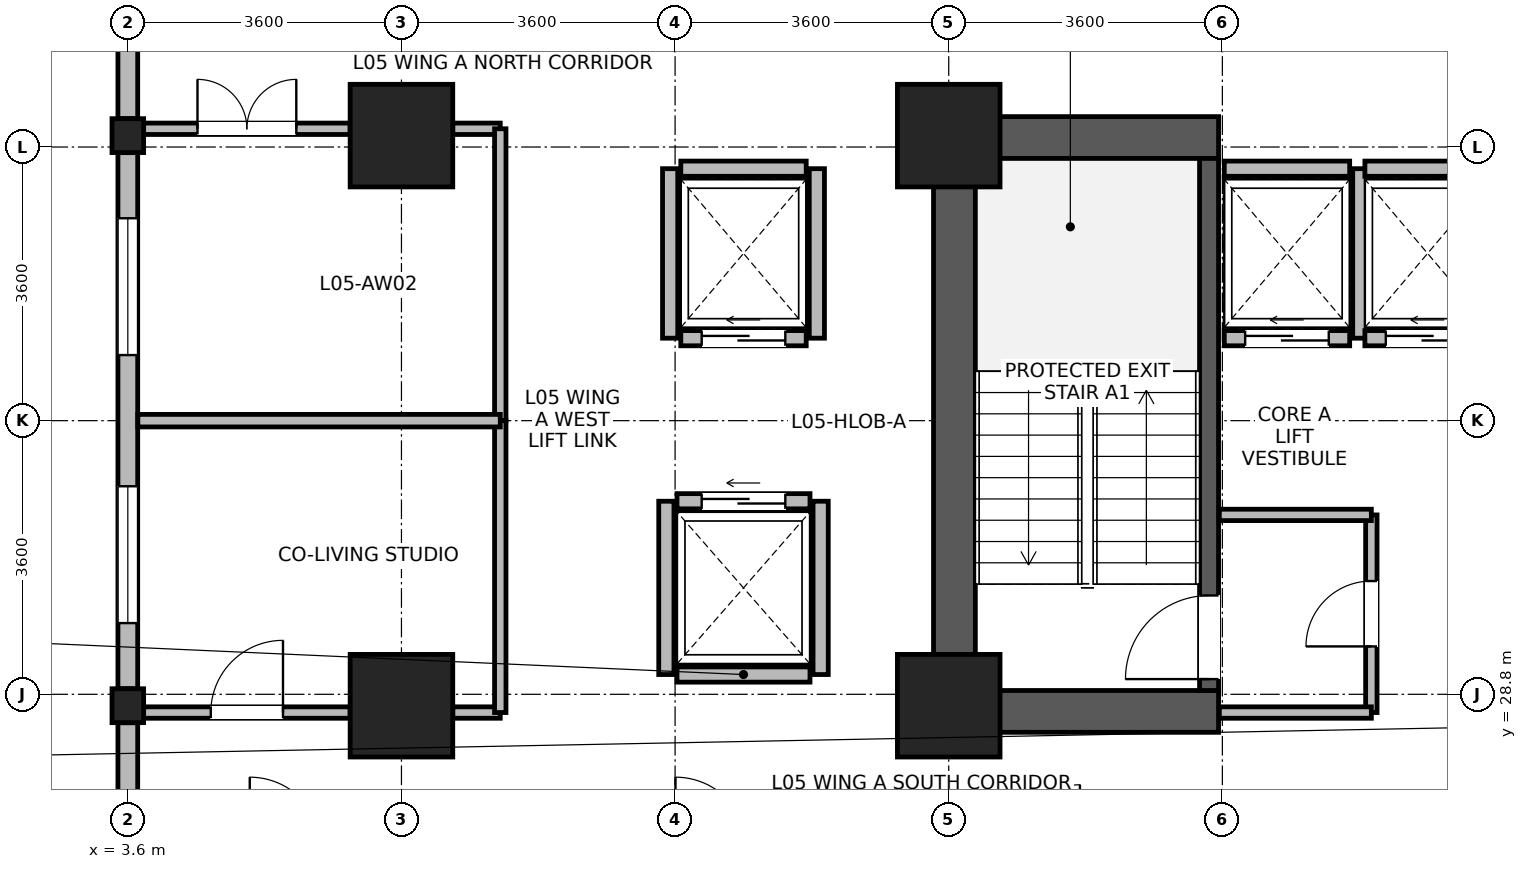
"""IFC4 building model, lengths in metres.
Left out: names, types, materials, properties, quantities, classifications, styles, units other than length and angle.
Written with IfcOpenShell. Run it as: python <this file> out.ifc"""

import sys

from ifc_helpers import new_model, si_unit, direction, frame, frame_2d, origin, origin_2d, place, context, subcontext, project, spatial, rectangle, i_section, extrude, source, transform, mapped, element, fill, save


model = new_model("IFC4")
c1 = context("Model", 3, precision=1e-05, world=origin(), true_north=direction((0.0, 1.0)))
c2 = subcontext(c1, "Body", "Model", "MODEL_VIEW")
j1 = project(units=[si_unit("LENGTHUNIT", "METRE"), si_unit("PLANEANGLEUNIT", "RADIAN")], contexts=[c1])
p1 = place(None, origin())
s1 = spatial("IfcSite", under=j1, at=p1, CompositionType="ELEMENT")
p2 = place(p1, origin())
s2 = spatial("IfcBuilding", under=s1, at=p2, CompositionType="ELEMENT")
p3 = place(p2, frame((0.0, 0.0, 25.3)))
s3 = spatial("IfcBuildingStorey", under=s2, at=p3, CompositionType="ELEMENT", Elevation=25.3)
p4 = place(p3, frame((14.475, 28.3, 0.0), z_axis=(0.0, 0.0, 1.0), x_axis=(0.0, 1.0, 0.0)))
e1 = element("IfcWall", 1, at=p4, inside=s3, PredefinedType="SHEAR", context=c2, shape_type="SweptSolid", body=[
    extrude(rectangle(XDim=8.1, YDim=0.55, at=frame_2d((4.05, 0.0))), origin(), (0.0, 0.0, 1.0), 3.45),
])
for number, where, z_axis, x_axis in (
    (2, (14.75, 28.575, 0.0), (0.0, 0.0, 1.0), (1.0, 0.0, 0.0)),
    (3, (14.75, 36.125, 0.0), (0.0, 0.0, 1.0), (1.0, 0.0, 0.0)),
):
    element("IfcWall", number, at=place(p3, frame(where, z_axis=z_axis, x_axis=x_axis)), inside=s3, PredefinedType="SHEAR", context=c2, shape_type="SweptSolid", body=[
        extrude(rectangle(XDim=3.2, YDim=0.55, at=frame_2d((1.6, 0.0))), origin(), (0.0, 0.0, 1.0), 3.45),
    ])
p5 = place(p3, frame((17.825, 28.85, 0.0), z_axis=(0.0, 0.0, 1.0), x_axis=(0.0, 1.0, 0.0)))
e4 = element("IfcWall", 4, at=p5, inside=s3, PredefinedType="SHEAR", context=c2, shape_type="SweptSolid", body=[
    extrude(rectangle(XDim=7.0, YDim=0.25, at=frame_2d((3.5, 0.0))), origin(), (0.0, 0.0, 1.0), 3.45),
])
p6 = place(p5, frame((0.15, 0.0, 0.0)))
e5 = element("IfcOpeningElement", 5, at=p6, cuts=e4, PredefinedType="OPENING", context=c2, shape_type="SweptSolid", body=[
    extrude(rectangle(XDim=1.1, YDim=2.08, at=frame_2d((0.55, 1.04))), frame((0.0, 0.135, 0.0), z_axis=(0.0, -1.0, 0.0), x_axis=(1.0, 0.0, 0.0)), (0.0, 0.0, 1.0), 0.27),
])
m1 = source(origin(), c2, "Body", "SweptSolid", [
    extrude(rectangle(XDim=1.35, YDim=1.35, at=origin_2d()), origin(), (0.0, 0.0, 1.0), 3.7),
])
for number, where, z_axis, x_axis in (
    (6, (7.2, 28.65, 0.0), (0.0, 0.0, 1.0), (1.0, 0.0, 0.0)),
    (7, (7.2, 36.15, 0.0), (0.0, 0.0, 1.0), (1.0, 0.0, 0.0)),
    (8, (14.4, 28.65, 0.0), (0.0, 0.0, 1.0), (1.0, 0.0, 0.0)),
    (9, (14.4, 36.15, 0.0), (0.0, 0.0, 1.0), (1.0, 0.0, 0.0)),
):
    element("IfcColumn", number, at=place(p3, frame(where, z_axis=z_axis, x_axis=x_axis)), inside=s3, PredefinedType="COLUMN", context=c2, shape_type="MappedRepresentation", body=[
        mapped(m1, transform((0.0, 0.0, 0.0), x_axis=(1.0, 0.0, 0.0), y_axis=(0.0, 1.0, 0.0), z_axis=(0.0, 0.0, 1.0), scale=1.0)),
    ])
m2 = source(origin(), c2, "Body", "SweptSolid", [
    extrude(i_section(OverallWidth=0.416, OverallDepth=0.446, WebThickness=0.029, FlangeThickness=0.04, FilletRadius=0.015, at=origin_2d()), origin(), (0.0, 0.0, 1.0), 3.7),
])
for number, where, z_axis, x_axis in (
    (10, (3.6, 28.65, 0.0), (0.0, 0.0, 1.0), (1.0, 0.0, 0.0)),
    (11, (3.6, 36.15, 0.0), (0.0, 0.0, 1.0), (1.0, 0.0, 0.0)),
):
    element("IfcColumn", number, at=place(p3, frame(where, z_axis=z_axis, x_axis=x_axis)), inside=s3, PredefinedType="COLUMN", context=c2, shape_type="MappedRepresentation", body=[
        mapped(m2, transform((0.0, 0.0, 0.0), x_axis=(1.0, 0.0, 0.0), y_axis=(0.0, 1.0, 0.0), z_axis=(0.0, 0.0, 1.0), scale=1.0)),
    ])
p7 = place(p3, frame((3.6, 36.374, 0.0), z_axis=(0.0, 0.0, 1.0), x_axis=(0.0, 1.0, 0.0)))
e12 = element("IfcWall", 12, at=p7, inside=s3, PredefinedType="STANDARD", context=c2, shape_type="SweptSolid", body=[
    extrude(rectangle(XDim=6.956, YDim=0.26, at=frame_2d((3.478, 0.0))), origin(), (0.0, 0.0, 1.0), 3.43),
])
p8 = place(p7, frame((3.867, 0.0, 0.85)))
e13 = element("IfcOpeningElement", 13, at=p8, cuts=e12, PredefinedType="OPENING", context=c2, shape_type="SweptSolid", body=[
    extrude(rectangle(XDim=2.7, YDim=2.05, at=frame_2d((1.35, 1.025))), frame((0.0, 0.14, 0.0), z_axis=(0.0, -1.0, 0.0), x_axis=(1.0, 0.0, 0.0)), (0.0, 0.0, 1.0), 0.28),
])
p9 = place(p7, frame((2.447, 0.0, 0.85)))
e14 = element("IfcOpeningElement", 14, at=p9, cuts=e12, PredefinedType="OPENING", context=c2, shape_type="SweptSolid", body=[
    extrude(rectangle(XDim=0.95, YDim=1.75, at=frame_2d((0.475, 0.875))), frame((0.0, 0.14, 0.0), z_axis=(0.0, -1.0, 0.0), x_axis=(1.0, 0.0, 0.0)), (0.0, 0.0, 1.0), 0.28),
])
p10 = place(p3, frame((3.6, 28.874, 0.0), z_axis=(0.0, 0.0, 1.0), x_axis=(0.0, 1.0, 0.0)))
e15 = element("IfcWall", 15, at=p10, inside=s3, PredefinedType="STANDARD", context=c2, shape_type="SweptSolid", body=[
    extrude(rectangle(XDim=7.052, YDim=0.26, at=frame_2d((3.526, 0.0))), origin(), (0.0, 0.0, 1.0), 2.93),
])
p11 = place(p10, frame((0.863, 0.0, 0.85)))
e16 = element("IfcOpeningElement", 16, at=p11, cuts=e15, PredefinedType="OPENING", context=c2, shape_type="SweptSolid", body=[
    extrude(rectangle(XDim=1.8, YDim=1.85, at=frame_2d((0.9, 0.925))), frame((0.0, 0.14, 0.0), z_axis=(0.0, -1.0, 0.0), x_axis=(1.0, 0.0, 0.0)), (0.0, 0.0, 1.0), 0.28),
])
p12 = place(p10, frame((4.389, 0.0, 0.85)))
e17 = element("IfcOpeningElement", 17, at=p12, cuts=e15, PredefinedType="OPENING", context=c2, shape_type="SweptSolid", body=[
    extrude(rectangle(XDim=1.8, YDim=1.85, at=frame_2d((0.9, 0.925))), frame((0.0, 0.14, 0.0), z_axis=(0.0, -1.0, 0.0), x_axis=(1.0, 0.0, 0.0)), (0.0, 0.0, 1.0), 0.28),
])
p13 = place(p3, frame((3.6, 21.47, 0.0), z_axis=(0.0, 0.0, 1.0), x_axis=(0.0, 1.0, 0.0)))
e18 = element("IfcWall", 18, at=p13, inside=s3, PredefinedType="STANDARD", context=c2, shape_type="SweptSolid", body=[
    extrude(rectangle(XDim=6.956, YDim=0.26, at=frame_2d((3.478, 0.0))), origin(), (0.0, 0.0, 1.0), 3.43),
])
p14 = place(p13, frame((0.389, 0.0, 0.85)))
e19 = element("IfcOpeningElement", 19, at=p14, cuts=e18, PredefinedType="OPENING", context=c2, shape_type="SweptSolid", body=[
    extrude(rectangle(XDim=2.7, YDim=2.05, at=frame_2d((1.35, 1.025))), frame((0.0, 0.14, 0.0), z_axis=(0.0, -1.0, 0.0), x_axis=(1.0, 0.0, 0.0)), (0.0, 0.0, 1.0), 0.28),
])
p15 = place(p13, frame((3.56, 0.0, 0.85)))
e20 = element("IfcOpeningElement", 20, at=p15, cuts=e18, PredefinedType="OPENING", context=c2, shape_type="SweptSolid", body=[
    extrude(rectangle(XDim=0.95, YDim=1.75, at=frame_2d((0.475, 0.875))), frame((0.0, 0.14, 0.0), z_axis=(0.0, -1.0, 0.0), x_axis=(1.0, 0.0, 0.0)), (0.0, 0.0, 1.0), 0.28),
])
p16 = place(p3, frame((18.025, 33.485, 0.0), z_axis=(0.0, 0.0, 1.0), x_axis=(1.0, 0.0, 0.0)))
e21 = element("IfcWall", 21, at=p16, inside=s3, PredefinedType="PARTITIONING", context=c2, shape_type="SweptSolid", body=[
    extrude(rectangle(XDim=1.65, YDim=0.2, at=frame_2d((0.825, 0.0))), origin(), (0.0, 0.0, 1.0), 3.43),
])
p17 = place(p16, frame((0.275, 0.0, 0.0)))
e22 = element("IfcOpeningElement", 22, at=p17, cuts=e21, PredefinedType="OPENING", context=c2, shape_type="SweptSolid", body=[
    extrude(rectangle(XDim=1.1, YDim=2.12, at=frame_2d((0.55, 1.06))), frame((0.0, 0.11, 0.0), z_axis=(0.0, -1.0, 0.0), x_axis=(1.0, 0.0, 0.0)), (0.0, 0.0, 1.0), 0.22),
])
p18 = place(p3, frame((18.025, 35.715, 0.0), z_axis=(0.0, 0.0, 1.0), x_axis=(1.0, 0.0, 0.0)))
e23 = element("IfcWall", 23, at=p18, inside=s3, PredefinedType="PARTITIONING", context=c2, shape_type="SweptSolid", body=[
    extrude(rectangle(XDim=1.65, YDim=0.2, at=frame_2d((0.825, 0.0))), origin(), (0.0, 0.0, 1.0), 2.23),
])
p19 = place(p3, frame((19.815, 33.485, 0.0), z_axis=(0.0, 0.0, 1.0), x_axis=(0.0, 1.0, 0.0)))
e24 = element("IfcWall", 24, at=p19, inside=s3, PredefinedType="PARTITIONING", context=c2, shape_type="SweptSolid", body=[
    extrude(rectangle(XDim=2.23, YDim=0.2, at=frame_2d((1.115, 0.0))), origin(), (0.0, 0.0, 1.0), 3.43),
])
p20 = place(p3, frame((19.875, 33.485, 0.0), z_axis=(0.0, 0.0, 1.0), x_axis=(1.0, 0.0, 0.0)))
e25 = element("IfcWall", 25, at=p20, inside=s3, PredefinedType="PARTITIONING", context=c2, shape_type="SweptSolid", body=[
    extrude(rectangle(XDim=1.65, YDim=0.2, at=frame_2d((0.825, 0.0))), origin(), (0.0, 0.0, 1.0), 3.43),
])
p21 = place(p20, frame((0.275, 0.0, 0.0)))
e26 = element("IfcOpeningElement", 26, at=p21, cuts=e25, PredefinedType="OPENING", context=c2, shape_type="SweptSolid", body=[
    extrude(rectangle(XDim=1.1, YDim=2.12, at=frame_2d((0.55, 1.06))), frame((0.0, 0.11, 0.0), z_axis=(0.0, -1.0, 0.0), x_axis=(1.0, 0.0, 0.0)), (0.0, 0.0, 1.0), 0.22),
])
p22 = place(p3, frame((19.875, 35.715, 0.0), z_axis=(0.0, 0.0, 1.0), x_axis=(1.0, 0.0, 0.0)))
e27 = element("IfcWall", 27, at=p22, inside=s3, PredefinedType="PARTITIONING", context=c2, shape_type="SweptSolid", body=[
    extrude(rectangle(XDim=1.65, YDim=0.2, at=frame_2d((0.825, 0.0))), origin(), (0.0, 0.0, 1.0), 2.23),
])
p23 = place(p3, frame((10.825, 29.06, 0.0), z_axis=(0.0, 0.0, 1.0), x_axis=(1.0, 0.0, 0.0)))
e28 = element("IfcWall", 28, at=p23, inside=s3, PredefinedType="PARTITIONING", context=c2, shape_type="SweptSolid", body=[
    extrude(rectangle(XDim=1.75, YDim=0.2, at=frame_2d((0.875, 0.0))), origin(), (0.0, 0.0, 1.0), 3.43),
])
p24 = place(p3, frame((10.825, 31.34, 0.0), z_axis=(0.0, 0.0, 1.0), x_axis=(1.0, 0.0, 0.0)))
e29 = element("IfcWall", 29, at=p24, inside=s3, PredefinedType="PARTITIONING", context=c2, shape_type="SweptSolid", body=[
    extrude(rectangle(XDim=1.75, YDim=0.2, at=frame_2d((0.875, 0.0))), origin(), (0.0, 0.0, 1.0), 3.43),
])
p25 = place(p24, frame((0.325, 0.0, 0.0)))
e30 = element("IfcOpeningElement", 30, at=p25, cuts=e29, PredefinedType="OPENING", context=c2, shape_type="SweptSolid", body=[
    extrude(rectangle(XDim=1.1, YDim=2.12, at=frame_2d((0.55, 1.06))), frame((0.0, 0.11, 0.0), z_axis=(0.0, -1.0, 0.0), x_axis=(1.0, 0.0, 0.0)), (0.0, 0.0, 1.0), 0.22),
])
for number, where, z_axis, x_axis in (
    (31, (10.685, 29.06, 0.0), (0.0, 0.0, 1.0), (0.0, 1.0, 0.0)),
    (32, (12.715, 29.06, 0.0), (0.0, 0.0, 1.0), (0.0, 1.0, 0.0)),
):
    element("IfcWall", number, at=place(p3, frame(where, z_axis=z_axis, x_axis=x_axis)), inside=s3, PredefinedType="PARTITIONING", context=c2, shape_type="SweptSolid", body=[
        extrude(rectangle(XDim=2.28, YDim=0.2, at=frame_2d((1.14, 0.0))), origin(), (0.0, 0.0, 1.0), 3.43),
    ])
p26 = place(p3, frame((10.875, 33.485, 0.0), z_axis=(0.0, 0.0, 1.0), x_axis=(1.0, 0.0, 0.0)))
e33 = element("IfcWall", 33, at=p26, inside=s3, PredefinedType="PARTITIONING", context=c2, shape_type="SweptSolid", body=[
    extrude(rectangle(XDim=1.65, YDim=0.2, at=frame_2d((0.825, 0.0))), origin(), (0.0, 0.0, 1.0), 3.43),
])
p27 = place(p26, frame((0.275, 0.0, 0.0)))
e34 = element("IfcOpeningElement", 34, at=p27, cuts=e33, PredefinedType="OPENING", context=c2, shape_type="SweptSolid", body=[
    extrude(rectangle(XDim=1.1, YDim=2.12, at=frame_2d((0.55, 1.06))), frame((0.0, 0.11, 0.0), z_axis=(0.0, -1.0, 0.0), x_axis=(1.0, 0.0, 0.0)), (0.0, 0.0, 1.0), 0.22),
])
p28 = place(p3, frame((10.875, 35.715, 0.0), z_axis=(0.0, 0.0, 1.0), x_axis=(1.0, 0.0, 0.0)))
e35 = element("IfcWall", 35, at=p28, inside=s3, PredefinedType="PARTITIONING", context=c2, shape_type="SweptSolid", body=[
    extrude(rectangle(XDim=1.65, YDim=0.2, at=frame_2d((0.825, 0.0))), origin(), (0.0, 0.0, 1.0), 3.43),
])
for number, where, z_axis, x_axis in (
    (36, (10.735, 33.485, 0.0), (0.0, 0.0, 1.0), (0.0, 1.0, 0.0)),
    (37, (12.665, 33.485, 0.0), (0.0, 0.0, 1.0), (0.0, 1.0, 0.0)),
):
    element("IfcWall", number, at=place(p3, frame(where, z_axis=z_axis, x_axis=x_axis)), inside=s3, PredefinedType="PARTITIONING", context=c2, shape_type="SweptSolid", body=[
        extrude(rectangle(XDim=2.23, YDim=0.2, at=frame_2d((1.115, 0.0))), origin(), (0.0, 0.0, 1.0), 3.43),
    ])
p29 = place(p3, frame((3.808, 28.56, 0.0), z_axis=(0.0, 0.0, 1.0), x_axis=(1.0, 0.0, 0.0)))
e38 = element("IfcWall", 38, at=p29, inside=s3, PredefinedType="PARTITIONING", context=c2, shape_type="SweptSolid", body=[
    extrude(rectangle(XDim=2.717, YDim=0.15, at=frame_2d((1.358, 0.0))), origin(), (0.0, 0.0, 1.0), 2.78),
])
p30 = place(p29, frame((0.884, 0.0, 0.0)))
e39 = element("IfcOpeningElement", 39, at=p30, cuts=e38, PredefinedType="OPENING", context=c2, shape_type="SweptSolid", body=[
    extrude(rectangle(XDim=0.95, YDim=2.1, at=frame_2d((0.475, 1.05))), frame((0.0, 0.085, 0.0), z_axis=(0.0, -1.0, 0.0), x_axis=(1.0, 0.0, 0.0)), (0.0, 0.0, 1.0), 0.17),
])
p31 = place(p3, frame((7.875, 28.56, 0.0), z_axis=(0.0, 0.0, 1.0), x_axis=(1.0, 0.0, 0.0)))
e40 = element("IfcWall", 40, at=p31, inside=s3, PredefinedType="PARTITIONING", context=c2, shape_type="SweptSolid", body=[
    extrude(rectangle(XDim=0.625, YDim=0.15, at=frame_2d((0.312, 0.0))), origin(), (0.0, 0.0, 1.0), 2.78),
])
p32 = place(p3, frame((3.808, 36.24, 0.0), z_axis=(0.0, 0.0, 1.0), x_axis=(1.0, 0.0, 0.0)))
e41 = element("IfcWall", 41, at=p32, inside=s3, PredefinedType="PARTITIONING", context=c2, shape_type="SweptSolid", body=[
    extrude(rectangle(XDim=2.717, YDim=0.15, at=frame_2d((1.358, 0.0))), origin(), (0.0, 0.0, 1.0), 2.78),
])
p33 = place(p32, frame((0.708, 0.0, 0.0)))
e42 = element("IfcOpeningElement", 42, at=p33, cuts=e41, PredefinedType="OPENING", context=c2, shape_type="SweptSolid", body=[
    extrude(rectangle(XDim=1.3, YDim=2.12, at=frame_2d((0.65, 1.06))), frame((0.0, 0.085, 0.0), z_axis=(0.0, -1.0, 0.0), x_axis=(1.0, 0.0, 0.0)), (0.0, 0.0, 1.0), 0.17),
])
p34 = place(p3, frame((7.875, 36.24, 0.0), z_axis=(0.0, 0.0, 1.0), x_axis=(1.0, 0.0, 0.0)))
e43 = element("IfcWall", 43, at=p34, inside=s3, PredefinedType="PARTITIONING", context=c2, shape_type="SweptSolid", body=[
    extrude(rectangle(XDim=0.625, YDim=0.15, at=frame_2d((0.312, 0.0))), origin(), (0.0, 0.0, 1.0), 2.78),
])
p35 = place(p3, frame((8.5, 32.4, 0.0), z_axis=(0.0, 0.0, 1.0), x_axis=(0.0, 1.0, 0.0)))
e44 = element("IfcWall", 44, at=p35, inside=s3, PredefinedType="PARTITIONING", context=c2, shape_type="SweptSolid", body=[
    extrude(rectangle(XDim=3.84, YDim=0.15, at=frame_2d((1.92, 0.0))), origin(), (0.0, 0.0, 1.0), 3.43),
])
p36 = place(p3, frame((8.5, 28.56, 0.0), z_axis=(0.0, 0.0, 1.0), x_axis=(0.0, 1.0, 0.0)))
e45 = element("IfcWall", 45, at=p36, inside=s3, PredefinedType="PARTITIONING", context=c2, shape_type="SweptSolid", body=[
    extrude(rectangle(XDim=3.84, YDim=0.15, at=frame_2d((1.92, 0.0))), origin(), (0.0, 0.0, 1.0), 3.43),
])
p37 = place(p3, frame((19.96, 28.56, 0.0), z_axis=(0.0, 0.0, 1.0), x_axis=(0.0, 1.0, 0.0)))
e46 = element("IfcWall", 46, at=p37, inside=s3, PredefinedType="PARTITIONING", context=c2, shape_type="SweptSolid", body=[
    extrude(rectangle(XDim=2.6, YDim=0.15, at=frame_2d((1.3, 0.0))), origin(), (0.0, 0.0, 1.0), 3.43),
])
p38 = place(p37, frame((0.87, 0.0, 0.0)))
e47 = element("IfcOpeningElement", 47, at=p38, cuts=e46, PredefinedType="OPENING", context=c2, shape_type="SweptSolid", body=[
    extrude(rectangle(XDim=0.86, YDim=2.02, at=frame_2d((0.43, 1.01))), frame((0.0, 0.085, 0.0), z_axis=(0.0, -1.0, 0.0), x_axis=(1.0, 0.0, 0.0)), (0.0, 0.0, 1.0), 0.17),
])
p39 = place(p3, frame((17.96, 28.56, 0.0), z_axis=(0.0, 0.0, 1.0), x_axis=(1.0, 0.0, 0.0)))
e48 = element("IfcWall", 48, at=p39, inside=s3, PredefinedType="PARTITIONING", context=c2, shape_type="SweptSolid", body=[
    extrude(rectangle(XDim=2.0, YDim=0.15, at=frame_2d((1.0, 0.0))), origin(), (0.0, 0.0, 1.0), 2.23),
])
p40 = place(p3, frame((17.96, 31.16, 0.0), z_axis=(0.0, 0.0, 1.0), x_axis=(1.0, 0.0, 0.0)))
e49 = element("IfcWall", 49, at=p40, inside=s3, PredefinedType="PARTITIONING", context=c2, shape_type="SweptSolid", body=[
    extrude(rectangle(XDim=2.0, YDim=0.15, at=frame_2d((1.0, 0.0))), origin(), (0.0, 0.0, 1.0), 3.43),
])
p41 = place(p3, frame((3.732, 32.4, 0.0), z_axis=(0.0, 0.0, 1.0), x_axis=(1.0, 0.0, 0.0)))
e50 = element("IfcWall", 50, at=p41, inside=s3, PredefinedType="PARTITIONING", context=c2, shape_type="SweptSolid", body=[
    extrude(rectangle(XDim=4.768, YDim=0.165, at=frame_2d((2.384, 0.0))), origin(), (0.0, 0.0, 1.0), 3.43),
])
p42 = place(p11, origin())
e51 = element("IfcWindow", 51, at=p42, inside=s3, PartitioningType="SINGLE_PANEL", PredefinedType="WINDOW", context=c2, shape_type="SweptSolid", body=[
    extrude(rectangle(XDim=1.8, YDim=1.85, at=frame_2d((0.9, 0.925))), frame((0.0, 0.03, 0.0), z_axis=(0.0, -1.0, 0.0), x_axis=(1.0, 0.0, 0.0)), (0.0, 0.0, 1.0), 0.06),
])
fill(e16, e51)
p43 = place(p12, origin())
e52 = element("IfcWindow", 52, at=p43, inside=s3, PartitioningType="SINGLE_PANEL", PredefinedType="WINDOW", context=c2, shape_type="SweptSolid", body=[
    extrude(rectangle(XDim=1.8, YDim=1.85, at=frame_2d((0.9, 0.925))), frame((0.0, 0.03, 0.0), z_axis=(0.0, -1.0, 0.0), x_axis=(1.0, 0.0, 0.0)), (0.0, 0.0, 1.0), 0.06),
])
fill(e17, e52)
p44 = place(p6, origin())
e53 = element("IfcDoor", 53, at=p44, inside=s3, OperationType="SINGLE_SWING_LEFT", PredefinedType="DOOR", context=c2, shape_type="SweptSolid", body=[
    extrude(rectangle(XDim=1.1, YDim=2.08, at=frame_2d((0.55, 1.04))), frame((0.0, 0.025, 0.0), z_axis=(0.0, -1.0, 0.0), x_axis=(1.0, 0.0, 0.0)), (0.0, 0.0, 1.0), 0.05),
])
fill(e5, e53)
p45 = place(p17, origin())
e54 = element("IfcDoor", 54, at=p45, inside=s3, OperationType="SLIDING_TO_LEFT", PredefinedType="DOOR", context=c2, shape_type="SweptSolid", body=[
    extrude(rectangle(XDim=1.1, YDim=2.12, at=frame_2d((0.55, 1.06))), frame((0.0, 0.025, 0.0), z_axis=(0.0, -1.0, 0.0), x_axis=(1.0, 0.0, 0.0)), (0.0, 0.0, 1.0), 0.05),
])
fill(e22, e54)
p46 = place(p21, origin())
e55 = element("IfcDoor", 55, at=p46, inside=s3, OperationType="SLIDING_TO_LEFT", PredefinedType="DOOR", context=c2, shape_type="SweptSolid", body=[
    extrude(rectangle(XDim=1.1, YDim=2.12, at=frame_2d((0.55, 1.06))), frame((0.0, 0.025, 0.0), z_axis=(0.0, -1.0, 0.0), x_axis=(1.0, 0.0, 0.0)), (0.0, 0.0, 1.0), 0.05),
])
fill(e26, e55)
p47 = place(p25, origin())
e56 = element("IfcDoor", 56, at=p47, inside=s3, OperationType="SLIDING_TO_LEFT", PredefinedType="DOOR", context=c2, shape_type="SweptSolid", body=[
    extrude(rectangle(XDim=1.1, YDim=2.12, at=frame_2d((0.55, 1.06))), frame((0.0, 0.025, 0.0), z_axis=(0.0, -1.0, 0.0), x_axis=(1.0, 0.0, 0.0)), (0.0, 0.0, 1.0), 0.05),
])
fill(e30, e56)
p48 = place(p27, origin())
e57 = element("IfcDoor", 57, at=p48, inside=s3, OperationType="SLIDING_TO_LEFT", PredefinedType="DOOR", context=c2, shape_type="SweptSolid", body=[
    extrude(rectangle(XDim=1.1, YDim=2.12, at=frame_2d((0.55, 1.06))), frame((0.0, 0.025, 0.0), z_axis=(0.0, -1.0, 0.0), x_axis=(1.0, 0.0, 0.0)), (0.0, 0.0, 1.0), 0.05),
])
fill(e34, e57)
p49 = place(p30, origin())
e58 = element("IfcDoor", 58, at=p49, inside=s3, OperationType="SINGLE_SWING_RIGHT", PredefinedType="DOOR", context=c2, shape_type="SweptSolid", body=[
    extrude(rectangle(XDim=0.95, YDim=2.1, at=frame_2d((0.475, 1.05))), frame((0.0, 0.025, 0.0), z_axis=(0.0, -1.0, 0.0), x_axis=(1.0, 0.0, 0.0)), (0.0, 0.0, 1.0), 0.05),
])
fill(e39, e58)
p50 = place(p33, origin())
e59 = element("IfcDoor", 59, at=p50, inside=s3, OperationType="DOUBLE_DOOR_SINGLE_SWING", PredefinedType="DOOR", context=c2, shape_type="SweptSolid", body=[
    extrude(rectangle(XDim=1.3, YDim=2.12, at=frame_2d((0.65, 1.06))), frame((0.0, 0.025, 0.0), z_axis=(0.0, -1.0, 0.0), x_axis=(1.0, 0.0, 0.0)), (0.0, 0.0, 1.0), 0.05),
])
fill(e42, e59)
p51 = place(p38, origin())
e60 = element("IfcDoor", 60, at=p51, inside=s3, OperationType="SINGLE_SWING_LEFT", PredefinedType="DOOR", context=c2, shape_type="SweptSolid", body=[
    extrude(rectangle(XDim=0.86, YDim=2.02, at=frame_2d((0.43, 1.01))), frame((0.0, 0.025, 0.0), z_axis=(0.0, -1.0, 0.0), x_axis=(1.0, 0.0, 0.0)), (0.0, 0.0, 1.0), 0.05),
])
fill(e47, e60)
save(model, sys.argv[1])
